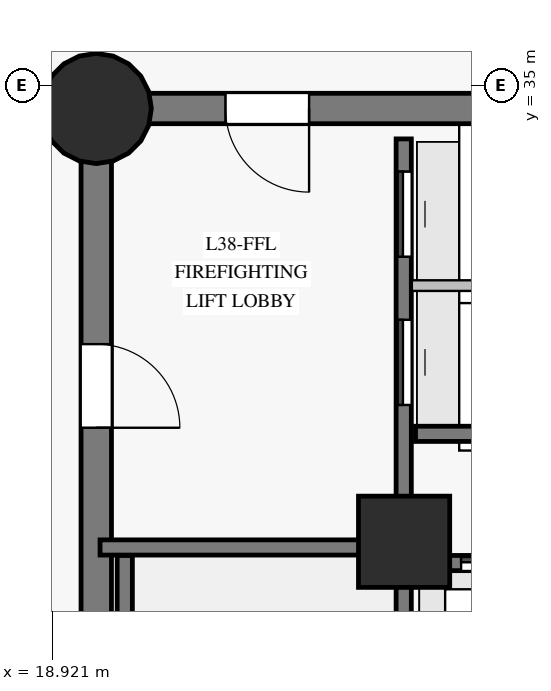
"""IFC4 building model, lengths in metres.
Left out: names, types, materials, properties, quantities, classifications, styles, units other than length and angle.
Written with IfcOpenShell. Run it as: python <this file> out.ifc"""

import sys

from ifc_helpers import new_model, si_unit, direction, frame, frame_2d, origin, origin_with_axes, origin_2d, place, context, subcontext, project, spatial, rectangle, circle, extrude, source, transform, mapped, element, fill, save


model = new_model("IFC4")
c1 = context("Model", 3, precision=1e-05, world=origin(), true_north=direction((0.0, 1.0)))
c2 = subcontext(c1, "Body", "Model", "MODEL_VIEW")
j1 = project(units=[si_unit("LENGTHUNIT", "METRE"), si_unit("PLANEANGLEUNIT", "RADIAN")], contexts=[c1])
p1 = place(None, origin())
s1 = spatial("IfcSite", under=j1, at=p1, CompositionType="ELEMENT")
p2 = place(p1, origin())
s2 = spatial("IfcBuilding", under=s1, at=p2, CompositionType="ELEMENT")
p3 = place(p2, frame((0.0, 0.0, 135.85)))
s3 = spatial("IfcBuildingStorey", under=s2, at=p3, CompositionType="ELEMENT", Elevation=135.85)
p4 = place(p3, frame((26.55, 34.7, 0.0), z_axis=(0.0, 0.0, 1.0), x_axis=(-1.0, 0.0, 0.0)))
e1 = element("IfcWall", 1, at=p4, inside=s3, PredefinedType="SHEAR", context=c2, shape_type="SweptSolid", body=[
    extrude(rectangle(XDim=7.05, YDim=0.4, at=frame_2d((3.525, 0.0))), origin(), (0.0, 0.0, 1.0), 2.825),
])
p5 = place(p4, frame((4.25, 0.0, 0.0)))
e2 = element("IfcOpeningElement", 2, at=p5, cuts=e1, PredefinedType="OPENING", context=c2, shape_type="SweptSolid", body=[
    extrude(rectangle(XDim=1.1, YDim=2.15, at=frame_2d((0.55, 1.075))), frame((0.0, 0.21, 0.0), z_axis=(0.0, -1.0, 0.0), x_axis=(1.0, 0.0, 0.0)), (0.0, 0.0, 1.0), 0.42),
])
p6 = place(p3, frame((19.5, 34.7, 0.0), z_axis=(0.0, 0.0, 1.0), x_axis=(0.0, -1.0, 0.0)))
e3 = element("IfcWall", 3, at=p6, inside=s3, PredefinedType="SHEAR", context=c2, shape_type="SweptSolid", body=[
    extrude(rectangle(XDim=16.4, YDim=0.4, at=frame_2d((8.2, 0.0))), origin(), (0.0, 0.0, 1.0), 2.825),
])
p7 = place(p6, frame((3.1, 0.0, 0.0)))
e4 = element("IfcOpeningElement", 4, at=p7, cuts=e3, PredefinedType="OPENING", context=c2, shape_type="SweptSolid", body=[
    extrude(rectangle(XDim=1.1, YDim=2.15, at=frame_2d((0.55, 1.075))), frame((0.0, 0.21, 0.0), z_axis=(0.0, -1.0, 0.0), x_axis=(1.0, 0.0, 0.0)), (0.0, 0.0, 1.0), 0.42),
])
m1 = source(origin_with_axes(), c2, "Body", "SweptSolid", [
    extrude(circle(Radius=0.725, at=origin_2d()), origin(), (0.0, 0.0, 1.0), 3.05),
])
p8 = place(p3, frame((19.5, 34.7, 0.0), z_axis=(0.0, 0.0, 1.0), x_axis=(1.0, 0.0, 0.0)))
e5 = element("IfcColumn", 5, at=p8, inside=s3, PredefinedType="COLUMN", context=c2, shape_type="MappedRepresentation", body=[
    mapped(m1, transform((0.0, 0.0, 0.0), scale=1.0)),
])
m2 = source(origin_with_axes(), c2, "Body", "SweptSolid", [
    extrude(rectangle(XDim=1.2, YDim=1.2, at=origin_2d()), origin(), (0.0, 0.0, 1.0), 3.05),
])
p9 = place(p3, frame((23.55, 29.0, 0.0), z_axis=(0.0, 0.0, 1.0), x_axis=(1.0, 0.0, 0.0)))
e6 = element("IfcColumn", 6, at=p9, inside=s3, PredefinedType="COLUMN", context=c2, shape_type="MappedRepresentation", body=[
    mapped(m2, transform((0.0, 0.0, 0.0), scale=1.0)),
])
p10 = place(p3, frame((23.545, 18.7, 0.0), z_axis=(0.0, 0.0, 1.0), x_axis=(0.0, 1.0, 0.0)))
e7 = element("IfcWall", 7, at=p10, inside=s3, PredefinedType="SHEAR", context=c2, shape_type="SweptSolid", body=[
    extrude(rectangle(XDim=15.6, YDim=0.2, at=frame_2d((7.8, 0.0))), origin(), (0.0, 0.0, 1.0), 2.825),
])
p11 = place(p10, frame((2.75, 0.0, 0.0)))
e8 = element("IfcOpeningElement", 8, at=p11, cuts=e7, PredefinedType="OPENING", context=c2, shape_type="SweptSolid", body=[
    extrude(rectangle(XDim=1.15, YDim=2.15, at=frame_2d((0.575, 1.075))), frame((0.0, 0.11, 0.0), z_axis=(0.0, -1.0, 0.0), x_axis=(1.0, 0.0, 0.0)), (0.0, 0.0, 1.0), 0.22),
])
p12 = place(p10, frame((0.14, 0.0, 0.0)))
e9 = element("IfcOpeningElement", 9, at=p12, cuts=e7, PredefinedType="OPENING", context=c2, shape_type="SweptSolid", body=[
    extrude(rectangle(XDim=0.88, YDim=2.1, at=frame_2d((0.44, 1.05))), frame((0.0, 0.11, 0.0), z_axis=(0.0, -1.0, 0.0), x_axis=(1.0, 0.0, 0.0)), (0.0, 0.0, 1.0), 0.22),
])
p13 = place(p10, frame((1.36, 0.0, 0.0)))
e10 = element("IfcOpeningElement", 10, at=p13, cuts=e7, PredefinedType="OPENING", context=c2, shape_type="SweptSolid", body=[
    extrude(rectangle(XDim=0.88, YDim=2.1, at=frame_2d((0.44, 1.05))), frame((0.0, 0.11, 0.0), z_axis=(0.0, -1.0, 0.0), x_axis=(1.0, 0.0, 0.0)), (0.0, 0.0, 1.0), 0.22),
])
p14 = place(p10, frame((12.1, 0.0, 0.0)))
e11 = element("IfcOpeningElement", 11, at=p14, cuts=e7, PredefinedType="OPENING", context=c2, shape_type="SweptSolid", body=[
    extrude(rectangle(XDim=1.12, YDim=2.15, at=frame_2d((0.56, 1.075))), frame((0.0, 0.11, 0.0), z_axis=(0.0, -1.0, 0.0), x_axis=(1.0, 0.0, 0.0)), (0.0, 0.0, 1.0), 0.22),
])
p15 = place(p10, frame((14.05, 0.0, 0.0)))
e12 = element("IfcOpeningElement", 12, at=p15, cuts=e7, PredefinedType="OPENING", context=c2, shape_type="SweptSolid", body=[
    extrude(rectangle(XDim=1.12, YDim=2.15, at=frame_2d((0.56, 1.075))), frame((0.0, 0.11, 0.0), z_axis=(0.0, -1.0, 0.0), x_axis=(1.0, 0.0, 0.0)), (0.0, 0.0, 1.0), 0.22),
])
p16 = place(p3, frame((23.7, 28.72, 0.0), z_axis=(0.0, 0.0, 1.0), x_axis=(1.0, 0.0, 0.0)))
e13 = element("IfcWall", 13, at=p16, inside=s3, PredefinedType="SHEAR", context=c2, shape_type="SweptSolid", body=[
    extrude(rectangle(XDim=9.6, YDim=0.2, at=frame_2d((4.8, 0.0))), origin(), (0.0, 0.0, 1.0), 2.825),
])
p17 = place(p16, frame((0.6, 0.0, 0.0)))
e14 = element("IfcOpeningElement", 14, at=p17, cuts=e13, PredefinedType="OPENING", context=c2, shape_type="SweptSolid", body=[
    extrude(rectangle(XDim=1.1, YDim=2.15, at=frame_2d((0.55, 1.075))), frame((0.0, 0.11, 0.0), z_axis=(0.0, -1.0, 0.0), x_axis=(1.0, 0.0, 0.0)), (0.0, 0.0, 1.0), 0.22),
])
p18 = place(p16, frame((2.98, 0.0, 0.0)))
e15 = element("IfcOpeningElement", 15, at=p18, cuts=e13, PredefinedType="OPENING", context=c2, shape_type="SweptSolid", body=[
    extrude(rectangle(XDim=1.1, YDim=2.15, at=frame_2d((0.55, 1.075))), frame((0.0, 0.11, 0.0), z_axis=(0.0, -1.0, 0.0), x_axis=(1.0, 0.0, 0.0)), (0.0, 0.0, 1.0), 0.22),
])
p19 = place(p16, frame((5.36, 0.0, 0.0)))
e16 = element("IfcOpeningElement", 16, at=p19, cuts=e13, PredefinedType="OPENING", context=c2, shape_type="SweptSolid", body=[
    extrude(rectangle(XDim=1.1, YDim=2.15, at=frame_2d((0.55, 1.075))), frame((0.0, 0.11, 0.0), z_axis=(0.0, -1.0, 0.0), x_axis=(1.0, 0.0, 0.0)), (0.0, 0.0, 1.0), 0.22),
])
p20 = place(p16, frame((7.74, 0.0, 0.0)))
e17 = element("IfcOpeningElement", 17, at=p20, cuts=e13, PredefinedType="OPENING", context=c2, shape_type="SweptSolid", body=[
    extrude(rectangle(XDim=1.1, YDim=2.15, at=frame_2d((0.55, 1.075))), frame((0.0, 0.11, 0.0), z_axis=(0.0, -1.0, 0.0), x_axis=(1.0, 0.0, 0.0)), (0.0, 0.0, 1.0), 0.22),
])
p21 = place(p3, frame((19.875, 21.32, 0.0), z_axis=(0.0, 0.0, 1.0), x_axis=(0.0, 1.0, 0.0)))
e18 = element("IfcWall", 18, at=p21, inside=s3, PredefinedType="SHEAR", context=c2, shape_type="SweptSolid", body=[
    extrude(rectangle(XDim=7.5, YDim=0.2, at=frame_2d((3.75, 0.0))), origin(), (0.0, 0.0, 1.0), 2.825),
])
p22 = place(p3, frame((19.55, 28.925, 0.0), z_axis=(0.0, 0.0, 1.0), x_axis=(1.0, 0.0, 0.0)))
e19 = element("IfcWall", 19, at=p22, inside=s3, PredefinedType="SHEAR", context=c2, shape_type="SweptSolid", body=[
    extrude(rectangle(XDim=3.995, YDim=0.2, at=frame_2d((1.998, 0.0))), origin(), (0.0, 0.0, 1.0), 2.825),
])
p23 = place(p3, frame((23.7, 30.42, 0.0), z_axis=(0.0, 0.0, 1.0), x_axis=(1.0, 0.0, 0.0)))
e20 = element("IfcWall", 20, at=p23, inside=s3, PredefinedType="SHEAR", context=c2, shape_type="SweptSolid", body=[
    extrude(rectangle(XDim=2.78, YDim=0.2, at=frame_2d((1.39, 0.0))), origin(), (0.0, 0.0, 1.0), 2.825),
])
p24 = place(p3, frame((23.652, 32.37, 0.0), z_axis=(0.0, 0.0, 1.0), x_axis=(1.0, 0.0, 0.0)))
e21 = element("IfcWall", 21, at=p24, inside=s3, PredefinedType="PARTITIONING", context=c2, shape_type="SweptSolid", body=[
    extrude(rectangle(XDim=2.828, YDim=0.14, at=frame_2d((1.414, 0.0))), origin(), (0.0, 0.0, 1.0), 2.825),
])
m3 = source(origin_with_axes(), c2, "Body", "SweptSolid", [
    extrude(rectangle(XDim=1.1, YDim=2.15, at=frame_2d((0.55, 1.075))), frame((0.0, 0.025, 0.0), z_axis=(0.0, -1.0, 0.0), x_axis=(1.0, 0.0, 0.0)), (0.0, 0.0, 1.0), 0.05),
])
p25 = place(p5, origin())
e22 = element("IfcDoor", 22, at=p25, inside=s3, OperationType="SINGLE_SWING_LEFT", PredefinedType="DOOR", context=c2, shape_type="MappedRepresentation", body=[
    mapped(m3, transform((0.0, 0.0, 0.0), scale=1.0)),
])
fill(e2, e22)
p26 = place(p7, origin())
e23 = element("IfcDoor", 23, at=p26, inside=s3, OperationType="SINGLE_SWING_RIGHT", PredefinedType="DOOR", context=c2, shape_type="MappedRepresentation", body=[
    mapped(m3, transform((0.0, 0.0, 0.0), scale=1.0)),
])
fill(e4, e23)
p27 = place(p17, origin())
e24 = element("IfcDoor", 24, at=p27, inside=s3, OperationType="SLIDING_TO_LEFT", PredefinedType="DOOR", context=c2, shape_type="MappedRepresentation", body=[
    mapped(m3, transform((0.0, 0.0, 0.0), scale=1.0)),
])
fill(e14, e24)
m4 = source(origin_with_axes(), c2, "Body", "SweptSolid", [
    extrude(rectangle(XDim=1.12, YDim=2.15, at=frame_2d((0.56, 1.075))), frame((0.0, 0.025, 0.0), z_axis=(0.0, -1.0, 0.0), x_axis=(1.0, 0.0, 0.0)), (0.0, 0.0, 1.0), 0.05),
])
p28 = place(p14, origin())
e25 = element("IfcDoor", 25, at=p28, inside=s3, OperationType="SLIDING_TO_LEFT", PredefinedType="DOOR", context=c2, shape_type="MappedRepresentation", body=[
    mapped(m4, transform((0.0, 0.0, 0.0), scale=1.0)),
])
fill(e11, e25)
p29 = place(p15, origin())
e26 = element("IfcDoor", 26, at=p29, inside=s3, OperationType="SLIDING_TO_RIGHT", PredefinedType="DOOR", context=c2, shape_type="MappedRepresentation", body=[
    mapped(m4, transform((0.0, 0.0, 0.0), scale=1.0)),
])
fill(e12, e26)
save(model, sys.argv[1])
